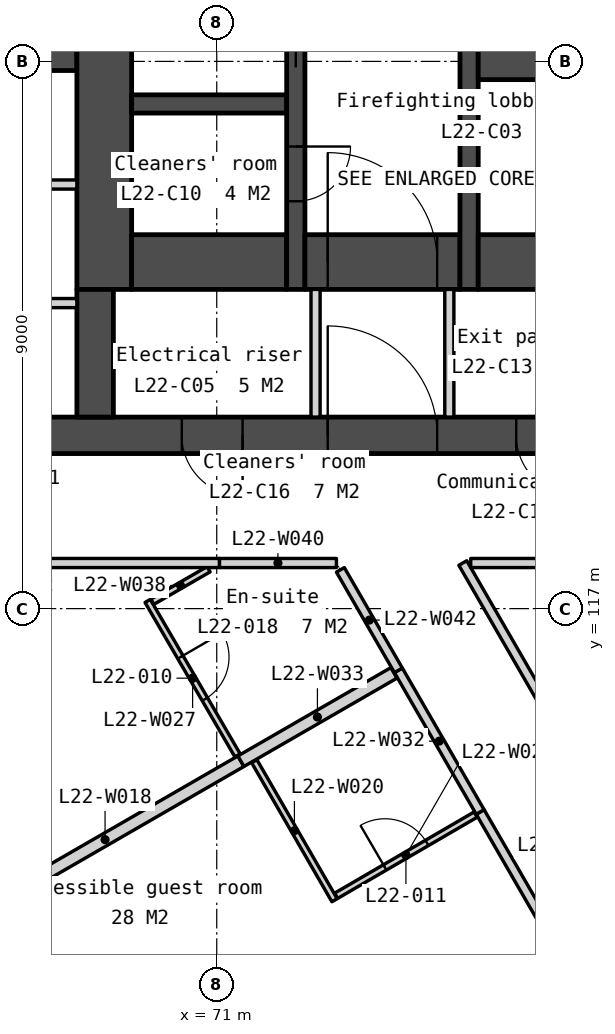
"""IFC4 building model, lengths in metres.
Left out: names, types, materials, properties, quantities, classifications, styles, units other than length and angle.
Written with IfcOpenShell. Run it as: python <this file> out.ifc"""

import sys

from ifc_helpers import new_model, si_unit, direction, frame, frame_2d, origin, place, context, subcontext, project, spatial, polyline, rectangle, outline, extrude, element, fill, save


model = new_model("IFC4")
c1 = context("Model", 3, precision=1e-05, world=origin(), true_north=direction((0.0, 1.0)))
c2 = subcontext(c1, "Body", "Model", "MODEL_VIEW")
j1 = project(units=[si_unit("LENGTHUNIT", "METRE"), si_unit("PLANEANGLEUNIT", "RADIAN")], contexts=[c1])
p1 = place(None, origin())
s1 = spatial("IfcSite", under=j1, at=p1, CompositionType="ELEMENT")
p2 = place(p1, origin())
s2 = spatial("IfcBuilding", under=s1, at=p2, CompositionType="ELEMENT")
p3 = place(p2, frame((0.0, 0.0, 92.3)))
s3 = spatial("IfcBuildingStorey", under=s2, at=p3, CompositionType="ELEMENT", Elevation=92.3)
p4 = place(p3, frame((66.0, 119.85, 0.0), z_axis=(0.0, 0.0, 1.0), x_axis=(1.0, 0.0, 0.0)))
e1 = element("IfcWall", 1, at=p4, inside=s3, PredefinedType="SOLIDWALL", context=c2, shape_type="SweptSolid", body=[
    extrude(rectangle(XDim=28.0, YDim=0.6, at=frame_2d((14.0, 0.0))), origin(), (0.0, 0.0, 1.0), 3.35),
])
p5 = place(p4, frame((6.825, 0.0, 0.0)))
e2 = element("IfcOpeningElement", 2, at=p5, cuts=e1, PredefinedType="OPENING", context=c2, shape_type="SweptSolid", body=[
    extrude(rectangle(XDim=1.8, YDim=2.1, at=frame_2d((0.9, 1.05))), frame((0.0, 0.31, 0.0), z_axis=(0.0, -1.0, 0.0), x_axis=(1.0, 0.0, 0.0)), (0.0, 0.0, 1.0), 0.62),
])
p6 = place(p4, frame((15.85, 0.0, 0.0)))
e3 = element("IfcOpeningElement", 3, at=p6, cuts=e1, PredefinedType="OPENING", context=c2, shape_type="SweptSolid", body=[
    extrude(rectangle(XDim=1.5, YDim=2.1, at=frame_2d((0.75, 1.05))), frame((0.0, 0.31, 0.0), z_axis=(0.0, -1.0, 0.0), x_axis=(1.0, 0.0, 0.0)), (0.0, 0.0, 1.0), 0.62),
])
p7 = place(p4, frame((19.375, 0.0, 0.0)))
e4 = element("IfcOpeningElement", 4, at=p7, cuts=e1, PredefinedType="OPENING", context=c2, shape_type="SweptSolid", body=[
    extrude(rectangle(XDim=1.8, YDim=2.1, at=frame_2d((0.9, 1.05))), frame((0.0, 0.31, 0.0), z_axis=(0.0, -1.0, 0.0), x_axis=(1.0, 0.0, 0.0)), (0.0, 0.0, 1.0), 0.62),
])
p8 = place(p4, frame((4.425, 0.0, 0.0)))
e5 = element("IfcOpeningElement", 5, at=p8, cuts=e1, PredefinedType="OPENING", context=c2, shape_type="SweptSolid", body=[
    extrude(rectangle(XDim=1.0, YDim=2.1, at=frame_2d((0.5, 1.05))), frame((0.0, 0.31, 0.0), z_axis=(0.0, -1.0, 0.0), x_axis=(1.0, 0.0, 0.0)), (0.0, 0.0, 1.0), 0.62),
])
p9 = place(p4, frame((9.925, 0.0, 0.0)))
e6 = element("IfcOpeningElement", 6, at=p9, cuts=e1, PredefinedType="OPENING", context=c2, shape_type="SweptSolid", body=[
    extrude(rectangle(XDim=1.0, YDim=2.1, at=frame_2d((0.5, 1.05))), frame((0.0, 0.31, 0.0), z_axis=(0.0, -1.0, 0.0), x_axis=(1.0, 0.0, 0.0)), (0.0, 0.0, 1.0), 0.62),
])
p10 = place(p4, frame((13.125, 0.0, 0.0)))
e7 = element("IfcOpeningElement", 7, at=p10, cuts=e1, PredefinedType="OPENING", context=c2, shape_type="SweptSolid", body=[
    extrude(rectangle(XDim=1.0, YDim=2.1, at=frame_2d((0.5, 1.05))), frame((0.0, 0.31, 0.0), z_axis=(0.0, -1.0, 0.0), x_axis=(1.0, 0.0, 0.0)), (0.0, 0.0, 1.0), 0.62),
])
p11 = place(p4, frame((21.725, 0.0, 0.0)))
e8 = element("IfcOpeningElement", 8, at=p11, cuts=e1, PredefinedType="OPENING", context=c2, shape_type="SweptSolid", body=[
    extrude(rectangle(XDim=1.0, YDim=2.1, at=frame_2d((0.5, 1.05))), frame((0.0, 0.31, 0.0), z_axis=(0.0, -1.0, 0.0), x_axis=(1.0, 0.0, 0.0)), (0.0, 0.0, 1.0), 0.62),
])
p12 = place(p4, frame((23.425, 0.0, 0.0)))
e9 = element("IfcOpeningElement", 9, at=p12, cuts=e1, PredefinedType="OPENING", context=c2, shape_type="SweptSolid", body=[
    extrude(rectangle(XDim=1.0, YDim=2.1, at=frame_2d((0.5, 1.05))), frame((0.0, 0.31, 0.0), z_axis=(0.0, -1.0, 0.0), x_axis=(1.0, 0.0, 0.0)), (0.0, 0.0, 1.0), 0.62),
])
p13 = place(p3, frame((66.6, 126.15, 0.0), z_axis=(0.0, 0.0, 1.0), x_axis=(1.0, 0.0, 0.0)))
e10 = element("IfcWall", 10, at=p13, inside=s3, PredefinedType="SOLIDWALL", context=c2, shape_type="SweptSolid", body=[
    extrude(rectangle(XDim=2.1, YDim=0.6, at=frame_2d((1.05, 0.0))), origin(), (0.0, 0.0, 1.0), 3.35),
])
for number, where, z_axis, x_axis in (
    (11, (66.6, 123.975, 0.0), (0.0, 0.0, 1.0), (1.0, 0.0, 0.0)),
    (12, (66.6, 122.025, 0.0), (0.0, 0.0, 1.0), (1.0, 0.0, 0.0)),
):
    element("IfcWall", number, at=place(p3, frame(where, z_axis=z_axis, x_axis=x_axis)), inside=s3, PredefinedType="PARTITIONING", context=c2, shape_type="SweptSolid", body=[
        extrude(rectangle(XDim=2.1, YDim=0.15, at=frame_2d((1.05, 0.0))), origin(), (0.0, 0.0, 1.0), 3.35),
    ])
p14 = place(p3, frame((69.15, 133.95, 0.0), z_axis=(0.0, 0.0, 1.0), x_axis=(0.0, -1.0, 0.0)))
e13 = element("IfcWall", 13, at=p14, inside=s3, PredefinedType="SOLIDWALL", context=c2, shape_type="SweptSolid", body=[
    extrude(rectangle(XDim=11.7, YDim=0.9, at=frame_2d((5.85, 0.0))), origin(), (0.0, 0.0, 1.0), 3.35),
])
p15 = place(p3, frame((69.0, 122.25, 0.0), z_axis=(0.0, 0.0, 1.0), x_axis=(0.0, -1.0, 0.0)))
e14 = element("IfcWall", 14, at=p15, inside=s3, PredefinedType="SOLIDWALL", context=c2, shape_type="SweptSolid", body=[
    extrude(rectangle(XDim=2.1, YDim=0.6, at=frame_2d((1.05, 0.0))), origin(), (0.0, 0.0, 1.0), 3.35),
])
p16 = place(p3, frame((69.6, 125.3, 0.0), z_axis=(0.0, 0.0, 1.0), x_axis=(1.0, 0.0, 0.0)))
e15 = element("IfcWall", 15, at=p16, inside=s3, PredefinedType="SOLIDWALL", context=c2, shape_type="SweptSolid", body=[
    extrude(rectangle(XDim=2.55, YDim=0.3, at=frame_2d((1.275, 0.0))), origin(), (0.0, 0.0, 1.0), 3.35),
])
p17 = place(p3, frame((69.6, 122.7, 0.0), z_axis=(0.0, 0.0, 1.0), x_axis=(1.0, 0.0, 0.0)))
e16 = element("IfcWall", 16, at=p17, inside=s3, PredefinedType="SOLIDWALL", context=c2, shape_type="SweptSolid", body=[
    extrude(rectangle(XDim=2.55, YDim=0.9, at=frame_2d((1.275, 0.0))), origin(), (0.0, 0.0, 1.0), 3.35),
])
p18 = place(p3, frame((72.3, 133.95, 0.0), z_axis=(0.0, 0.0, 1.0), x_axis=(0.0, -1.0, 0.0)))
e17 = element("IfcWall", 17, at=p18, inside=s3, PredefinedType="SOLIDWALL", context=c2, shape_type="SweptSolid", body=[
    extrude(rectangle(XDim=11.7, YDim=0.3, at=frame_2d((5.85, 0.0))), origin(), (0.0, 0.0, 1.0), 3.35),
])
p19 = place(p18, frame((6.95, 0.0, 0.0)))
e18 = element("IfcOpeningElement", 18, at=p19, cuts=e17, PredefinedType="OPENING", context=c2, shape_type="SweptSolid", body=[
    extrude(rectangle(XDim=1.1, YDim=2.1, at=frame_2d((0.55, 1.05))), frame((0.0, 0.16, 0.0), z_axis=(0.0, -1.0, 0.0), x_axis=(1.0, 0.0, 0.0)), (0.0, 0.0, 1.0), 0.32),
])
p20 = place(p18, frame((9.35, 0.0, 0.0)))
e19 = element("IfcOpeningElement", 19, at=p20, cuts=e17, PredefinedType="OPENING", context=c2, shape_type="SweptSolid", body=[
    extrude(rectangle(XDim=0.9, YDim=2.1, at=frame_2d((0.45, 1.05))), frame((0.0, 0.16, 0.0), z_axis=(0.0, -1.0, 0.0), x_axis=(1.0, 0.0, 0.0)), (0.0, 0.0, 1.0), 0.32),
])
p21 = place(p18, frame((5.1, 0.0, 0.0)))
e20 = element("IfcOpeningElement", 20, at=p21, cuts=e17, PredefinedType="OPENING", context=c2, shape_type="SweptSolid", body=[
    extrude(rectangle(XDim=1.0, YDim=2.1, at=frame_2d((0.5, 1.05))), frame((0.0, 0.16, 0.0), z_axis=(0.0, -1.0, 0.0), x_axis=(1.0, 0.0, 0.0)), (0.0, 0.0, 1.0), 0.32),
])
p22 = place(p3, frame((72.45, 122.7, 0.0), z_axis=(0.0, 0.0, 1.0), x_axis=(1.0, 0.0, 0.0)))
e21 = element("IfcWall", 21, at=p22, inside=s3, PredefinedType="SOLIDWALL", context=c2, shape_type="SweptSolid", body=[
    extrude(rectangle(XDim=2.55, YDim=0.9, at=frame_2d((1.275, 0.0))), origin(), (0.0, 0.0, 1.0), 3.35),
])
p23 = place(p22, frame((0.375, 0.0, 0.0)))
e22 = element("IfcOpeningElement", 22, at=p23, cuts=e21, PredefinedType="OPENING", context=c2, shape_type="SweptSolid", body=[
    extrude(rectangle(XDim=1.8, YDim=2.1, at=frame_2d((0.9, 1.05))), frame((0.0, 0.46, 0.0), z_axis=(0.0, -1.0, 0.0), x_axis=(1.0, 0.0, 0.0)), (0.0, 0.0, 1.0), 0.92),
])
for number, where, z_axis, x_axis in (
    (23, (72.625, 122.25, 0.0), (0.0, 0.0, 1.0), (0.0, -1.0, 0.0)),
    (24, (74.825, 122.25, 0.0), (0.0, 0.0, 1.0), (0.0, -1.0, 0.0)),
):
    element("IfcWall", number, at=place(p3, frame(where, z_axis=z_axis, x_axis=x_axis)), inside=s3, PredefinedType="PARTITIONING", context=c2, shape_type="SweptSolid", body=[
        extrude(rectangle(XDim=2.1, YDim=0.15, at=frame_2d((1.05, 0.0))), origin(), (0.0, 0.0, 1.0), 3.35),
    ])
p24 = place(p3, frame((75.15, 133.95, 0.0), z_axis=(0.0, 0.0, 1.0), x_axis=(0.0, -1.0, 0.0)))
e25 = element("IfcWall", 25, at=p24, inside=s3, PredefinedType="SOLIDWALL", context=c2, shape_type="SweptSolid", body=[
    extrude(rectangle(XDim=11.7, YDim=0.3, at=frame_2d((5.85, 0.0))), origin(), (0.0, 0.0, 1.0), 3.35),
])
p25 = place(p3, frame((75.3, 126.075, 0.0), z_axis=(0.0, 0.0, 1.0), x_axis=(1.0, 0.0, 0.0)))
e26 = element("IfcWall", 26, at=p25, inside=s3, PredefinedType="SOLIDWALL", context=c2, shape_type="SweptSolid", body=[
    extrude(rectangle(XDim=2.1, YDim=0.75, at=frame_2d((1.05, 0.0))), origin(), (0.0, 0.0, 1.0), 3.35),
])
p26 = place(p3, frame((75.3, 122.7, 0.0), z_axis=(0.0, 0.0, 1.0), x_axis=(1.0, 0.0, 0.0)))
e27 = element("IfcWall", 27, at=p26, inside=s3, PredefinedType="SOLIDWALL", context=c2, shape_type="SweptSolid", body=[
    extrude(rectangle(XDim=6.2, YDim=0.9, at=frame_2d((3.1, 0.0))), origin(), (0.0, 0.0, 1.0), 3.35),
])
p27 = place(p3, frame((56.073, 130.263, -0.15), z_axis=(0.0, 0.0, 1.0), x_axis=(0.500000478905, -0.866025127289, 0.0)))
e28 = element("IfcWall", 28, at=p27, inside=s3, PredefinedType="SOLIDWALL", context=c2, shape_type="SweptSolid", body=[
    extrude(outline(polyline([(42.643, 0.0), (42.643, 3.5), (0.0, 3.5), (0.0, 0.0), (42.643, 0.0)])), frame((0.0, 0.225, 0.0), z_axis=(0.0, -1.0, 0.0), x_axis=(1.0, 0.0, 0.0)), (0.0, 0.0, 1.0), 0.45),
])
p28 = place(p27, frame((2.814, 0.0, 1.05)))
e29 = element("IfcOpeningElement", 29, at=p28, cuts=e28, PredefinedType="OPENING", context=c2, shape_type="SweptSolid", body=[
    extrude(rectangle(XDim=1.2, YDim=1.5, at=frame_2d((0.6, 0.75))), frame((0.0, 0.235, 0.0), z_axis=(0.0, -1.0, 0.0), x_axis=(1.0, 0.0, 0.0)), (0.0, 0.0, 1.0), 0.47),
])
p29 = place(p27, frame((4.514, 0.0, 1.05)))
e30 = element("IfcOpeningElement", 30, at=p29, cuts=e28, PredefinedType="OPENING", context=c2, shape_type="SweptSolid", body=[
    extrude(rectangle(XDim=1.2, YDim=1.5, at=frame_2d((0.6, 0.75))), frame((0.0, 0.235, 0.0), z_axis=(0.0, -1.0, 0.0), x_axis=(1.0, 0.0, 0.0)), (0.0, 0.0, 1.0), 0.47),
])
p30 = place(p27, frame((11.343, 0.0, 1.05)))
e31 = element("IfcOpeningElement", 31, at=p30, cuts=e28, PredefinedType="OPENING", context=c2, shape_type="SweptSolid", body=[
    extrude(rectangle(XDim=1.2, YDim=1.5, at=frame_2d((0.6, 0.75))), frame((0.0, 0.235, 0.0), z_axis=(0.0, -1.0, 0.0), x_axis=(1.0, 0.0, 0.0)), (0.0, 0.0, 1.0), 0.47),
])
p31 = place(p27, frame((13.043, 0.0, 1.05)))
e32 = element("IfcOpeningElement", 32, at=p31, cuts=e28, PredefinedType="OPENING", context=c2, shape_type="SweptSolid", body=[
    extrude(rectangle(XDim=1.2, YDim=1.5, at=frame_2d((0.6, 0.75))), frame((0.0, 0.235, 0.0), z_axis=(0.0, -1.0, 0.0), x_axis=(1.0, 0.0, 0.0)), (0.0, 0.0, 1.0), 0.47),
])
p32 = place(p27, frame((19.872, 0.0, 1.05)))
e33 = element("IfcOpeningElement", 33, at=p32, cuts=e28, PredefinedType="OPENING", context=c2, shape_type="SweptSolid", body=[
    extrude(rectangle(XDim=1.2, YDim=1.5, at=frame_2d((0.6, 0.75))), frame((0.0, 0.235, 0.0), z_axis=(0.0, -1.0, 0.0), x_axis=(1.0, 0.0, 0.0)), (0.0, 0.0, 1.0), 0.47),
])
p33 = place(p27, frame((21.572, 0.0, 1.05)))
e34 = element("IfcOpeningElement", 34, at=p33, cuts=e28, PredefinedType="OPENING", context=c2, shape_type="SweptSolid", body=[
    extrude(rectangle(XDim=1.2, YDim=1.5, at=frame_2d((0.6, 0.75))), frame((0.0, 0.235, 0.0), z_axis=(0.0, -1.0, 0.0), x_axis=(1.0, 0.0, 0.0)), (0.0, 0.0, 1.0), 0.47),
])
p34 = place(p27, frame((28.4, 0.0, 1.05)))
e35 = element("IfcOpeningElement", 35, at=p34, cuts=e28, PredefinedType="OPENING", context=c2, shape_type="SweptSolid", body=[
    extrude(rectangle(XDim=1.2, YDim=1.5, at=frame_2d((0.6, 0.75))), frame((0.0, 0.235, 0.0), z_axis=(0.0, -1.0, 0.0), x_axis=(1.0, 0.0, 0.0)), (0.0, 0.0, 1.0), 0.47),
])
p35 = place(p27, frame((30.1, 0.0, 1.05)))
e36 = element("IfcOpeningElement", 36, at=p35, cuts=e28, PredefinedType="OPENING", context=c2, shape_type="SweptSolid", body=[
    extrude(rectangle(XDim=1.2, YDim=1.5, at=frame_2d((0.6, 0.75))), frame((0.0, 0.235, 0.0), z_axis=(0.0, -1.0, 0.0), x_axis=(1.0, 0.0, 0.0)), (0.0, 0.0, 1.0), 0.47),
])
p36 = place(p27, frame((36.929, 0.0, 1.05)))
e37 = element("IfcOpeningElement", 37, at=p36, cuts=e28, PredefinedType="OPENING", context=c2, shape_type="SweptSolid", body=[
    extrude(rectangle(XDim=1.2, YDim=1.5, at=frame_2d((0.6, 0.75))), frame((0.0, 0.235, 0.0), z_axis=(0.0, -1.0, 0.0), x_axis=(1.0, 0.0, 0.0)), (0.0, 0.0, 1.0), 0.47),
])
p37 = place(p27, frame((38.629, 0.0, 1.05)))
e38 = element("IfcOpeningElement", 38, at=p37, cuts=e28, PredefinedType="OPENING", context=c2, shape_type="SweptSolid", body=[
    extrude(rectangle(XDim=1.2, YDim=1.5, at=frame_2d((0.6, 0.75))), frame((0.0, 0.235, 0.0), z_axis=(0.0, -1.0, 0.0), x_axis=(1.0, 0.0, 0.0)), (0.0, 0.0, 1.0), 0.47),
])
p38 = place(p3, frame((75.332, 113.656, 0.0), z_axis=(0.0, 0.0, 1.0), x_axis=(0.499995531332, -0.866027983755, 0.0)))
e39 = element("IfcWall", 39, at=p38, inside=s3, PredefinedType="PARTITIONING", context=c2, shape_type="SweptSolid", body=[
    extrude(rectangle(XDim=5.495, YDim=0.15, at=frame_2d((2.747, 0.0))), origin(), (0.0, 0.0, 1.0), 3.35),
])
p39 = place(p38, frame((2.247, 0.0, 0.0)))
e40 = element("IfcOpeningElement", 40, at=p39, cuts=e39, PredefinedType="OPENING", context=c2, shape_type="SweptSolid", body=[
    extrude(rectangle(XDim=1.0, YDim=2.1, at=frame_2d((0.5, 1.05))), frame((0.0, 0.085, 0.0), z_axis=(0.0, -1.0, 0.0), x_axis=(1.0, 0.0, 0.0)), (0.0, 0.0, 1.0), 0.17),
])
p40 = place(p3, frame((66.929, 111.91, 0.0), z_axis=(0.0, 0.0, 1.0), x_axis=(0.866021702275, 0.500006411147, 0.0)))
e41 = element("IfcWall", 41, at=p40, inside=s3, PredefinedType="PARTITIONING", context=c2, shape_type="SweptSolid", body=[
    extrude(rectangle(XDim=5.16, YDim=0.2, at=frame_2d((2.58, 0.0))), origin(), (0.0, 0.0, 1.0), 3.35),
])
p41 = place(p3, frame((71.617, 114.49, 0.0), z_axis=(0.0, 0.0, 1.0), x_axis=(0.500007957085, -0.86602080971, 0.0)))
e42 = element("IfcWall", 42, at=p41, inside=s3, PredefinedType="PARTITIONING", context=c2, shape_type="SweptSolid", body=[
    extrude(rectangle(XDim=2.64, YDim=0.1, at=frame_2d((1.32, 0.0))), origin(), (0.0, 0.0, 1.0), 3.35),
])
p42 = place(p3, frame((72.964, 112.277, 0.0), z_axis=(0.0, 0.0, 1.0), x_axis=(0.864225488694, 0.503104665742, 0.0)))
e43 = element("IfcWall", 43, at=p42, inside=s3, PredefinedType="PARTITIONING", context=c2, shape_type="SweptSolid", body=[
    extrude(rectangle(XDim=2.655, YDim=0.1, at=frame_2d((1.327, 0.0))), origin(), (0.0, 0.0, 1.0), 3.35),
])
p43 = place(p42, frame((0.927, 0.0, 0.0)))
e44 = element("IfcOpeningElement", 44, at=p43, cuts=e43, PredefinedType="OPENING", context=c2, shape_type="SweptSolid", body=[
    extrude(rectangle(XDim=0.8, YDim=2.1, at=frame_2d((0.4, 1.05))), frame((0.0, 0.06, 0.0), z_axis=(0.0, -1.0, 0.0), x_axis=(1.0, 0.0, 0.0)), (0.0, 0.0, 1.0), 0.12),
])
p44 = place(p3, frame((69.864, 117.126, 0.0), z_axis=(0.0, 0.0, 1.0), x_axis=(0.502920651267, -0.864332585599, 0.0)))
e45 = element("IfcWall", 45, at=p44, inside=s3, PredefinedType="PARTITIONING", context=c2, shape_type="SweptSolid", body=[
    extrude(rectangle(XDim=2.94, YDim=0.1, at=frame_2d((1.47, 0.0))), origin(), (0.0, 0.0, 1.0), 3.35),
])
p45 = place(p44, frame((1.07, 0.0, 0.0)))
e46 = element("IfcOpeningElement", 46, at=p45, cuts=e45, PredefinedType="OPENING", context=c2, shape_type="SweptSolid", body=[
    extrude(rectangle(XDim=0.8, YDim=2.1, at=frame_2d((0.4, 1.05))), frame((0.0, 0.06, 0.0), z_axis=(0.0, -1.0, 0.0), x_axis=(1.0, 0.0, 0.0)), (0.0, 0.0, 1.0), 0.12),
])
p46 = place(p3, frame((73.987, 115.985, 0.0), z_axis=(0.0, 0.0, 1.0), x_axis=(0.499994808408, -0.866028401131, 0.0)))
e47 = element("IfcWall", 47, at=p46, inside=s3, PredefinedType="PARTITIONING", context=c2, shape_type="SweptSolid", body=[
    extrude(rectangle(XDim=2.69, YDim=0.15, at=frame_2d((1.345, 0.0))), origin(), (0.0, 0.0, 1.0), 3.35),
])
p47 = place(p3, frame((71.398, 114.49, 0.0), z_axis=(0.0, 0.0, 1.0), x_axis=(0.866026028799, 0.499998917442, 0.0)))
e48 = element("IfcWall", 48, at=p47, inside=s3, PredefinedType="PARTITIONING", context=c2, shape_type="SweptSolid", body=[
    extrude(rectangle(XDim=2.905, YDim=0.2, at=frame_2d((1.452, 0.0))), origin(), (0.0, 0.0, 1.0), 3.35),
])
p48 = place(p3, frame((69.941, 117.113, 0.0), z_axis=(0.0, 0.0, 1.0), x_axis=(0.866040989419, 0.499973003918, 0.0)))
e49 = element("IfcWall", 49, at=p48, inside=s3, PredefinedType="PARTITIONING", context=c2, shape_type="SweptSolid", body=[
    extrude(rectangle(XDim=1.068, YDim=0.1, at=frame_2d((0.534, 0.0))), origin(), (0.0, 0.0, 1.0), 3.35),
])
p49 = place(p3, frame((71.044, 117.75, 0.0), z_axis=(0.0, 0.0, 1.0), x_axis=(1.0, 0.0, 0.0)))
e50 = element("IfcWall", 50, at=p49, inside=s3, PredefinedType="PARTITIONING", context=c2, shape_type="SweptSolid", body=[
    extrude(rectangle(XDim=1.925, YDim=0.15, at=frame_2d((0.962, 0.0))), origin(), (0.0, 0.0, 1.0), 3.35),
])
p50 = place(p3, frame((64.275, 117.75, 0.0), z_axis=(0.0, 0.0, 1.0), x_axis=(1.0, 0.0, 0.0)))
e51 = element("IfcWall", 51, at=p50, inside=s3, PredefinedType="PARTITIONING", context=c2, shape_type="SweptSolid", body=[
    extrude(rectangle(XDim=6.769, YDim=0.15, at=frame_2d((3.384, 0.0))), origin(), (0.0, 0.0, 1.0), 3.35),
])
p51 = place(p50, frame((2.884, 0.0, 0.0)))
e52 = element("IfcOpeningElement", 52, at=p51, cuts=e51, PredefinedType="OPENING", context=c2, shape_type="SweptSolid", body=[
    extrude(rectangle(XDim=1.0, YDim=2.1, at=frame_2d((0.5, 1.05))), frame((0.0, 0.085, 0.0), z_axis=(0.0, -1.0, 0.0), x_axis=(1.0, 0.0, 0.0)), (0.0, 0.0, 1.0), 0.17),
])
p52 = place(p3, frame((73.033, 117.637, 0.0), z_axis=(0.0, 0.0, 1.0), x_axis=(0.500006788699, -0.866021484292, 0.0)))
e53 = element("IfcWall", 53, at=p52, inside=s3, PredefinedType="PARTITIONING", context=c2, shape_type="SweptSolid", body=[
    extrude(rectangle(XDim=1.908, YDim=0.15, at=frame_2d((0.954, 0.0))), origin(), (0.0, 0.0, 1.0), 3.35),
])
p53 = place(p3, frame((75.047, 117.75, 0.0), z_axis=(0.0, 0.0, 1.0), x_axis=(0.49999841397, -0.866026319477, 0.0)))
e54 = element("IfcWall", 54, at=p53, inside=s3, PredefinedType="PARTITIONING", context=c2, shape_type="SweptSolid", body=[
    extrude(rectangle(XDim=9.777, YDim=0.15, at=frame_2d((4.888, 0.0))), origin(), (0.0, 0.0, 1.0), 3.35),
])
p54 = place(p3, frame((75.177, 117.75, 0.0), z_axis=(0.0, 0.0, 1.0), x_axis=(1.0, 0.0, 0.0)))
e55 = element("IfcWall", 55, at=p54, inside=s3, PredefinedType="PARTITIONING", context=c2, shape_type="SweptSolid", body=[
    extrude(rectangle(XDim=9.647, YDim=0.15, at=frame_2d((4.823, 0.0))), origin(), (0.0, 0.0, 1.0), 3.35),
])
p55 = place(p19, origin())
e56 = element("IfcDoor", 56, at=p55, inside=s3, OperationType="SLIDING_TO_LEFT", PredefinedType="DOOR", context=c2, shape_type="SweptSolid", body=[
    extrude(rectangle(XDim=1.1, YDim=2.1, at=frame_2d((0.55, 1.05))), frame((0.0, 0.025, 0.0), z_axis=(0.0, -1.0, 0.0), x_axis=(1.0, 0.0, 0.0)), (0.0, 0.0, 1.0), 0.05),
])
fill(e18, e56)
p56 = place(p23, origin())
e57 = element("IfcDoor", 57, at=p56, inside=s3, OperationType="DOUBLE_DOOR_DOUBLE_SWING", PredefinedType="DOOR", context=c2, shape_type="SweptSolid", body=[
    extrude(rectangle(XDim=1.8, YDim=2.1, at=frame_2d((0.9, 1.05))), frame((0.0, 0.025, 0.0), z_axis=(0.0, -1.0, 0.0), x_axis=(1.0, 0.0, 0.0)), (0.0, 0.0, 1.0), 0.05),
])
fill(e22, e57)
p57 = place(p5, origin())
e58 = element("IfcDoor", 58, at=p57, inside=s3, OperationType="DOUBLE_DOOR_DOUBLE_SWING", PredefinedType="DOOR", context=c2, shape_type="SweptSolid", body=[
    extrude(rectangle(XDim=1.8, YDim=2.1, at=frame_2d((0.9, 1.05))), frame((0.0, 0.025, 0.0), z_axis=(0.0, -1.0, 0.0), x_axis=(1.0, 0.0, 0.0)), (0.0, 0.0, 1.0), 0.05),
])
fill(e2, e58)
p58 = place(p20, origin())
e59 = element("IfcDoor", 59, at=p58, inside=s3, OperationType="SINGLE_SWING_LEFT", PredefinedType="DOOR", context=c2, shape_type="SweptSolid", body=[
    extrude(rectangle(XDim=0.9, YDim=2.1, at=frame_2d((0.45, 1.05))), frame((0.0, 0.025, 0.0), z_axis=(0.0, -1.0, 0.0), x_axis=(1.0, 0.0, 0.0)), (0.0, 0.0, 1.0), 0.05),
])
fill(e19, e59)
p59 = place(p8, origin())
e60 = element("IfcDoor", 60, at=p59, inside=s3, OperationType="SINGLE_SWING_RIGHT", PredefinedType="DOOR", context=c2, shape_type="SweptSolid", body=[
    extrude(rectangle(XDim=1.0, YDim=2.1, at=frame_2d((0.5, 1.05))), frame((0.0, 0.025, 0.0), z_axis=(0.0, -1.0, 0.0), x_axis=(1.0, 0.0, 0.0)), (0.0, 0.0, 1.0), 0.05),
])
fill(e5, e60)
p60 = place(p9, origin())
e61 = element("IfcDoor", 61, at=p60, inside=s3, OperationType="SINGLE_SWING_RIGHT", PredefinedType="DOOR", context=c2, shape_type="SweptSolid", body=[
    extrude(rectangle(XDim=1.0, YDim=2.1, at=frame_2d((0.5, 1.05))), frame((0.0, 0.025, 0.0), z_axis=(0.0, -1.0, 0.0), x_axis=(1.0, 0.0, 0.0)), (0.0, 0.0, 1.0), 0.05),
])
fill(e6, e61)
p61 = place(p45, origin())
e62 = element("IfcDoor", 62, at=p61, inside=s3, OperationType="SINGLE_SWING_LEFT", PredefinedType="DOOR", context=c2, shape_type="SweptSolid", body=[
    extrude(rectangle(XDim=0.8, YDim=2.1, at=frame_2d((0.4, 1.05))), frame((0.0, 0.025, 0.0), z_axis=(0.0, -1.0, 0.0), x_axis=(1.0, 0.0, 0.0)), (0.0, 0.0, 1.0), 0.05),
])
fill(e46, e62)
p62 = place(p43, origin())
e63 = element("IfcDoor", 63, at=p62, inside=s3, OperationType="SINGLE_SWING_LEFT", PredefinedType="DOOR", context=c2, shape_type="SweptSolid", body=[
    extrude(rectangle(XDim=0.8, YDim=2.1, at=frame_2d((0.4, 1.05))), frame((0.0, 0.025, 0.0), z_axis=(0.0, -1.0, 0.0), x_axis=(1.0, 0.0, 0.0)), (0.0, 0.0, 1.0), 0.05),
])
fill(e44, e63)
save(model, sys.argv[1])
